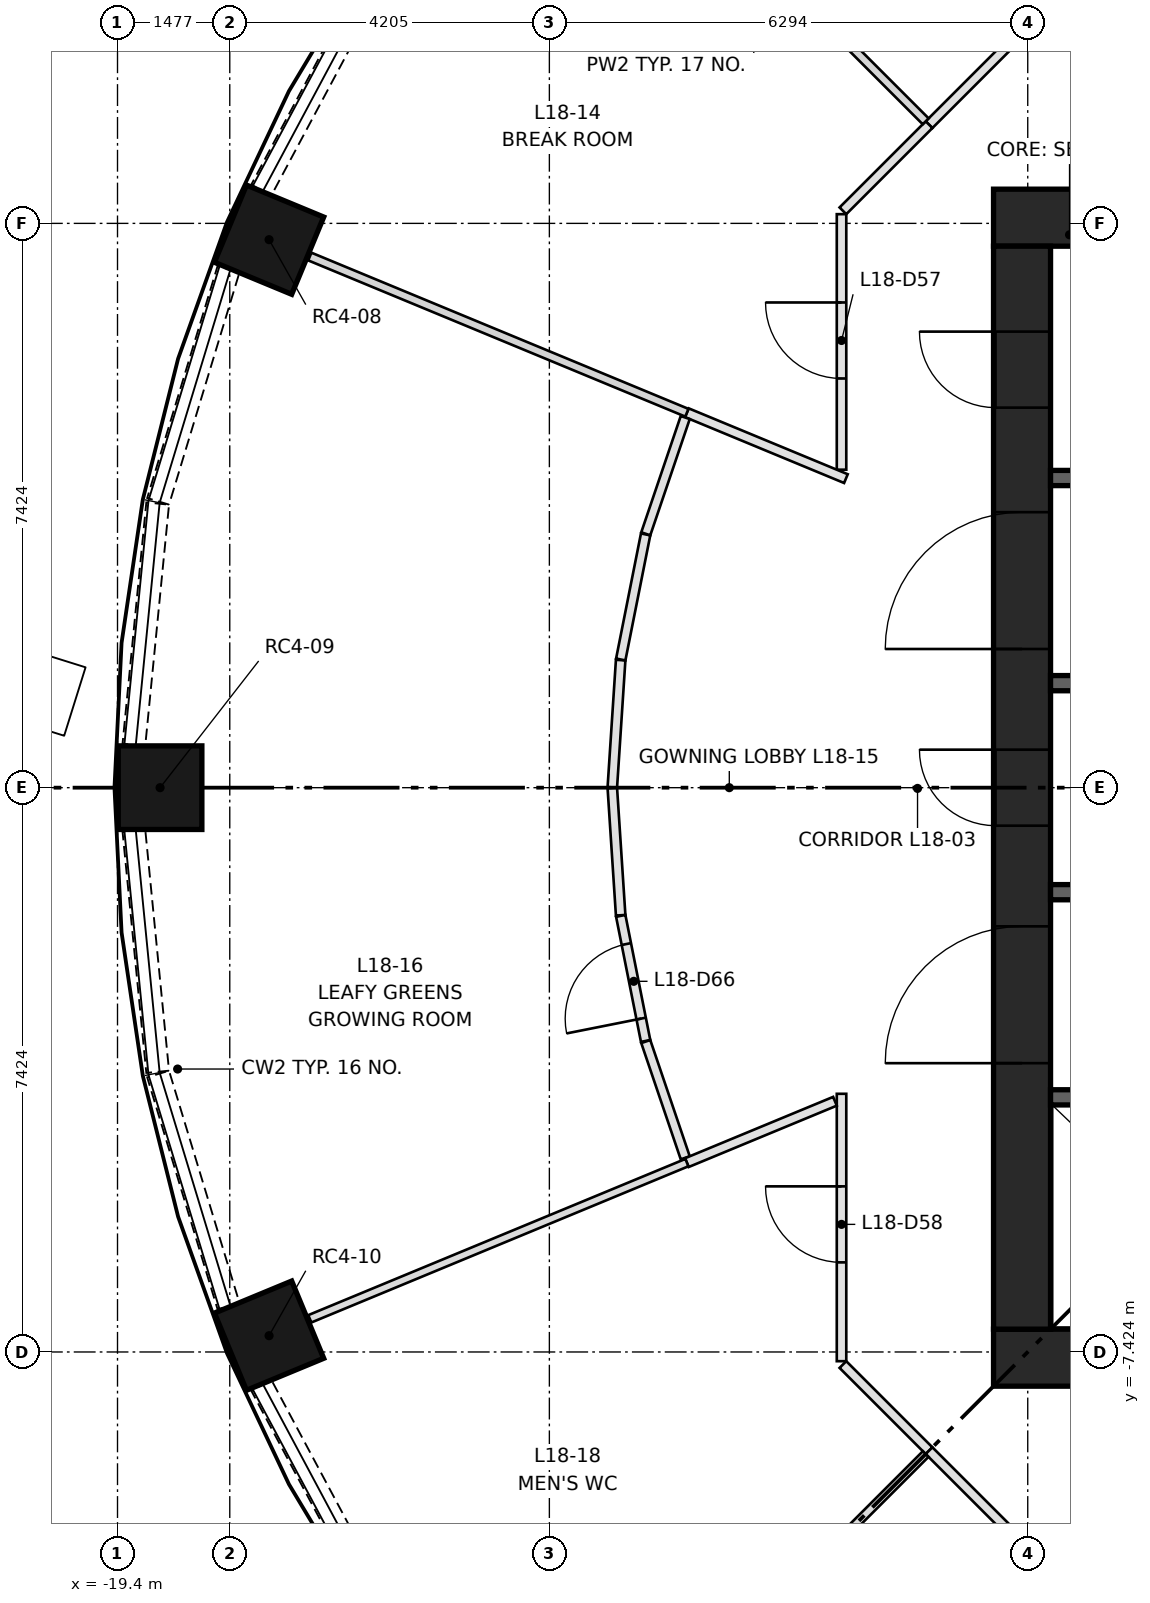
"""IFC4 building model, lengths in metres.
Left out: names, types, materials, properties, quantities, classifications, styles, units other than length and angle.
Written with IfcOpenShell. Run it as: python <this file> out.ifc"""

import sys

from ifc_helpers import new_model, si_unit, direction, frame, frame_2d, origin, origin_2d, place, context, subcontext, project, spatial, rectangle, extrude, element, fill, save


model = new_model("IFC4")
c1 = context("Model", 3, precision=1e-05, world=origin(), true_north=direction((0.0, 1.0)))
c2 = subcontext(c1, "Body", "Model", "MODEL_VIEW")
j1 = project(units=[si_unit("LENGTHUNIT", "METRE"), si_unit("PLANEANGLEUNIT", "RADIAN")], contexts=[c1])
p1 = place(None, origin())
s1 = spatial("IfcSite", under=j1, at=p1, CompositionType="ELEMENT")
p2 = place(p1, origin())
s2 = spatial("IfcBuilding", under=s1, at=p2, CompositionType="ELEMENT")
p3 = place(p2, frame((0.0, 0.0, 72.75)))
s3 = spatial("IfcBuildingStorey", under=s2, at=p3, CompositionType="ELEMENT", Elevation=72.75)
for number, where, z_axis, x_axis in (
    (1, (-17.406, 7.21, 0.0), (0.0, 0.0, 1.0), (-0.924, 0.383, 0.0)),
    (2, (-18.84, 0.0, 0.0), (0.0, 0.0, 1.0), (-1.0, 0.0, 0.0)),
    (3, (-17.406, -7.21, 0.0), (0.0, 0.0, 1.0), (-0.924, -0.383, 0.0)),
):
    element("IfcColumn", number, at=place(p3, frame(where, z_axis=z_axis, x_axis=x_axis)), inside=s3, PredefinedType="COLUMN", context=c2, shape_type="SweptSolid", body=[
        extrude(rectangle(XDim=1.1, YDim=1.1, at=origin_2d()), origin(), (0.0, 0.0, 1.0), 3.65),
    ])
for number, where, z_axis, x_axis in (
    (4, (-7.874, -7.499, 0.0), (0.0, 0.0, 1.0), (1.0, 0.0, 0.0)),
    (5, (-7.874, 7.499, 0.0), (0.0, 0.0, 1.0), (1.0, 0.0, 0.0)),
):
    element("IfcWall", number, at=place(p3, frame(where, z_axis=z_axis, x_axis=x_axis)), inside=s3, PredefinedType="SHEAR", context=c2, shape_type="SweptSolid", body=[
        extrude(rectangle(XDim=15.748, YDim=0.75, at=frame_2d((7.874, 0.0))), origin(), (0.0, 0.0, 1.0), 3.65),
    ])
p4 = place(p3, frame((-7.499, -7.124, 0.0), z_axis=(0.0, 0.0, 1.0), x_axis=(0.0, 1.0, 0.0)))
e6 = element("IfcWall", 6, at=p4, inside=s3, PredefinedType="SHEAR", context=c2, shape_type="SweptSolid", body=[
    extrude(rectangle(XDim=14.248, YDim=0.75, at=frame_2d((7.124, 0.0))), origin(), (0.0, 0.0, 1.0), 3.65),
])
p5 = place(p4, frame((6.624, 0.0, 0.0)))
e7 = element("IfcOpeningElement", 7, at=p5, cuts=e6, PredefinedType="OPENING", context=c2, shape_type="SweptSolid", body=[
    extrude(rectangle(XDim=1.0, YDim=2.1, at=frame_2d((0.5, 1.05))), frame((0.0, 0.385, 0.0), z_axis=(0.0, -1.0, 0.0), x_axis=(1.0, 0.0, 0.0)), (0.0, 0.0, 1.0), 0.77),
])
p6 = place(p4, frame((3.5, 0.0, 0.0)))
e8 = element("IfcOpeningElement", 8, at=p6, cuts=e6, PredefinedType="OPENING", context=c2, shape_type="SweptSolid", body=[
    extrude(rectangle(XDim=1.8, YDim=2.1, at=frame_2d((0.9, 1.05))), frame((0.0, 0.385, 0.0), z_axis=(0.0, -1.0, 0.0), x_axis=(1.0, 0.0, 0.0)), (0.0, 0.0, 1.0), 0.77),
])
p7 = place(p4, frame((8.948, 0.0, 0.0)))
e9 = element("IfcOpeningElement", 9, at=p7, cuts=e6, PredefinedType="OPENING", context=c2, shape_type="SweptSolid", body=[
    extrude(rectangle(XDim=1.8, YDim=2.1, at=frame_2d((0.9, 1.05))), frame((0.0, 0.385, 0.0), z_axis=(0.0, -1.0, 0.0), x_axis=(1.0, 0.0, 0.0)), (0.0, 0.0, 1.0), 0.77),
])
p8 = place(p4, frame((12.124, 0.0, 0.0)))
e10 = element("IfcOpeningElement", 10, at=p8, cuts=e6, PredefinedType="OPENING", context=c2, shape_type="SweptSolid", body=[
    extrude(rectangle(XDim=1.0, YDim=2.1, at=frame_2d((0.5, 1.05))), frame((0.0, 0.385, 0.0), z_axis=(0.0, -1.0, 0.0), x_axis=(1.0, 0.0, 0.0)), (0.0, 0.0, 1.0), 0.77),
])
p9 = place(p3, frame((-7.124, -4.074, 0.0), z_axis=(0.0, 0.0, 1.0), x_axis=(1.0, 0.0, 0.0)))
e11 = element("IfcWall", 11, at=p9, inside=s3, PredefinedType="SHEAR", context=c2, shape_type="SweptSolid", body=[
    extrude(rectangle(XDim=14.248, YDim=0.2, at=frame_2d((7.124, 0.0))), origin(), (0.0, 0.0, 1.0), 3.3),
])
p10 = place(p9, frame((1.069, 0.0, 0.0)))
e12 = element("IfcOpeningElement", 12, at=p10, cuts=e11, PredefinedType="OPENING", context=c2, shape_type="SweptSolid", body=[
    extrude(rectangle(XDim=1.1, YDim=2.1, at=frame_2d((0.55, 1.05))), frame((0.0, 0.11, 0.0), z_axis=(0.0, -1.0, 0.0), x_axis=(1.0, 0.0, 0.0)), (0.0, 0.0, 1.0), 0.22),
])
p11 = place(p9, frame((4.206, 0.0, 0.0)))
e13 = element("IfcOpeningElement", 13, at=p11, cuts=e11, PredefinedType="OPENING", context=c2, shape_type="SweptSolid", body=[
    extrude(rectangle(XDim=1.1, YDim=2.1, at=frame_2d((0.55, 1.05))), frame((0.0, 0.11, 0.0), z_axis=(0.0, -1.0, 0.0), x_axis=(1.0, 0.0, 0.0)), (0.0, 0.0, 1.0), 0.22),
])
p12 = place(p9, frame((6.808, 0.0, 0.0)))
e14 = element("IfcOpeningElement", 14, at=p12, cuts=e11, PredefinedType="OPENING", context=c2, shape_type="SweptSolid", body=[
    extrude(rectangle(XDim=1.0, YDim=2.1, at=frame_2d((0.5, 1.05))), frame((0.0, 0.11, 0.0), z_axis=(0.0, -1.0, 0.0), x_axis=(1.0, 0.0, 0.0)), (0.0, 0.0, 1.0), 0.22),
])
p13 = place(p9, frame((8.777, 0.0, 0.0)))
e15 = element("IfcOpeningElement", 15, at=p13, cuts=e11, PredefinedType="OPENING", context=c2, shape_type="SweptSolid", body=[
    extrude(rectangle(XDim=1.0, YDim=2.1, at=frame_2d((0.5, 1.05))), frame((0.0, 0.11, 0.0), z_axis=(0.0, -1.0, 0.0), x_axis=(1.0, 0.0, 0.0)), (0.0, 0.0, 1.0), 0.22),
])
p14 = place(p9, frame((10.745, 0.0, 0.0)))
e16 = element("IfcOpeningElement", 16, at=p14, cuts=e11, PredefinedType="OPENING", context=c2, shape_type="SweptSolid", body=[
    extrude(rectangle(XDim=1.0, YDim=2.1, at=frame_2d((0.5, 1.05))), frame((0.0, 0.11, 0.0), z_axis=(0.0, -1.0, 0.0), x_axis=(1.0, 0.0, 0.0)), (0.0, 0.0, 1.0), 0.22),
])
p15 = place(p9, frame((12.714, 0.0, 0.0)))
e17 = element("IfcOpeningElement", 17, at=p15, cuts=e11, PredefinedType="OPENING", context=c2, shape_type="SweptSolid", body=[
    extrude(rectangle(XDim=1.0, YDim=2.1, at=frame_2d((0.5, 1.05))), frame((0.0, 0.11, 0.0), z_axis=(0.0, -1.0, 0.0), x_axis=(1.0, 0.0, 0.0)), (0.0, 0.0, 1.0), 0.22),
])
p16 = place(p3, frame((-7.124, 4.074, 0.0), z_axis=(0.0, 0.0, 1.0), x_axis=(1.0, 0.0, 0.0)))
e18 = element("IfcWall", 18, at=p16, inside=s3, PredefinedType="SHEAR", context=c2, shape_type="SweptSolid", body=[
    extrude(rectangle(XDim=7.124, YDim=0.2, at=frame_2d((3.562, 0.0))), origin(), (0.0, 0.0, 1.0), 3.3),
])
for number, where, z_axis, x_axis in (
    (19, (-7.124, -1.375, 0.0), (0.0, 0.0, 1.0), (1.0, 0.0, 0.0)),
    (20, (-7.124, 1.375, 0.0), (0.0, 0.0, 1.0), (1.0, 0.0, 0.0)),
):
    element("IfcWall", number, at=place(p3, frame(where, z_axis=z_axis, x_axis=x_axis)), inside=s3, PredefinedType="SHEAR", context=c2, shape_type="SweptSolid", body=[
        extrude(rectangle(XDim=2.75, YDim=0.2, at=frame_2d((1.375, 0.0))), origin(), (0.0, 0.0, 1.0), 3.3),
    ])
p17 = place(p3, frame((-16.004, 10.676, 0.0), z_axis=(0.0, 0.0, 1.0), x_axis=(-0.471354692163, -0.8819437364, 0.0)))
e21 = element("IfcWall", 21, at=p17, inside=s3, PredefinedType="SOLIDWALL", context=c2, shape_type="SweptSolid", body=[
    extrude(rectangle(XDim=3.19, YDim=0.3, at=frame_2d((1.595, 0.0))), origin(), (0.0, 0.0, 1.0), 0.9),
])
p18 = place(p3, frame((-17.939, 6.821, 0.0), z_axis=(0.0, 0.0, 1.0), x_axis=(-0.290238876314, -0.956954228099, 0.0)))
e22 = element("IfcWall", 22, at=p18, inside=s3, PredefinedType="SOLIDWALL", context=c2, shape_type="SweptSolid", body=[
    extrude(rectangle(XDim=3.191, YDim=0.3, at=frame_2d((1.595, 0.0))), origin(), (0.0, 0.0, 1.0), 0.9),
])
for number, where, z_axis, x_axis in (
    (23, (-18.872, 3.738, 0.0), (0.0, 0.0, 1.0), (-0.098, -0.995, 0.0)),
    (24, (-19.185, -0.564, 0.0), (0.0, 0.0, 1.0), (0.098, -0.995, 0.0)),
):
    element("IfcWall", number, at=place(p3, frame(where, z_axis=z_axis, x_axis=x_axis)), inside=s3, PredefinedType="SOLIDWALL", context=c2, shape_type="SweptSolid", body=[
        extrude(rectangle(XDim=3.189, YDim=0.3, at=frame_2d((1.595, 0.0))), origin(), (0.0, 0.0, 1.0), 0.9),
    ])
p19 = place(p3, frame((-18.865, -3.767, 0.0), z_axis=(0.0, 0.0, 1.0), x_axis=(0.290238876314, -0.956954228099, 0.0)))
e25 = element("IfcWall", 25, at=p19, inside=s3, PredefinedType="SOLIDWALL", context=c2, shape_type="SweptSolid", body=[
    extrude(rectangle(XDim=3.191, YDim=0.3, at=frame_2d((1.595, 0.0))), origin(), (0.0, 0.0, 1.0), 0.9),
])
p20 = place(p3, frame((-17.508, -7.862, 0.0), z_axis=(0.0, 0.0, 1.0), x_axis=(0.471354692163, -0.8819437364, 0.0)))
e26 = element("IfcWall", 26, at=p20, inside=s3, PredefinedType="SOLIDWALL", context=c2, shape_type="SweptSolid", body=[
    extrude(rectangle(XDim=3.19, YDim=0.3, at=frame_2d((1.595, 0.0))), origin(), (0.0, 0.0, 1.0), 0.9),
])
p21 = place(p3, frame((-8.722, 8.722, 0.0), z_axis=(0.0, 0.0, 1.0), x_axis=(0.707030604857, 0.70718294931, 0.0)))
e27 = element("IfcWall", 27, at=p21, inside=s3, PredefinedType="PARTITIONING", context=c2, shape_type="SweptSolid", body=[
    extrude(rectangle(XDim=1.603, YDim=0.125, at=frame_2d((0.801, 0.0))), origin(), (0.0, 0.0, 1.0), 3.3),
])
p22 = place(p3, frame((-9.874, 4.183, 0.0), z_axis=(0.0, 0.0, 1.0), x_axis=(0.0, 1.0, 0.0)))
e28 = element("IfcWall", 28, at=p22, inside=s3, PredefinedType="PARTITIONING", context=c2, shape_type="SweptSolid", body=[
    extrude(rectangle(XDim=3.362, YDim=0.125, at=frame_2d((1.681, 0.0))), origin(), (0.0, 0.0, 1.0), 3.3),
])
p23 = place(p22, frame((1.2, 0.0, 0.0)))
e29 = element("IfcOpeningElement", 29, at=p23, cuts=e28, PredefinedType="OPENING", context=c2, shape_type="SweptSolid", body=[
    extrude(rectangle(XDim=1.0, YDim=2.1, at=frame_2d((0.5, 1.05))), frame((0.0, 0.073, 0.0), z_axis=(0.0, -1.0, 0.0), x_axis=(1.0, 0.0, 0.0)), (0.0, 0.0, 1.0), 0.145),
])
p24 = place(p3, frame((-9.856, 7.589, 0.0), z_axis=(0.0, 0.0, 1.0), x_axis=(0.70718294931, 0.707030604857, 0.0)))
e30 = element("IfcWall", 30, at=p24, inside=s3, PredefinedType="PARTITIONING", context=c2, shape_type="SweptSolid", body=[
    extrude(rectangle(XDim=1.603, YDim=0.125, at=frame_2d((0.801, 0.0))), origin(), (0.0, 0.0, 1.0), 3.3),
])
p25 = place(p3, frame((-9.874, -7.545, 0.0), z_axis=(0.0, 0.0, 1.0), x_axis=(0.0, 1.0, 0.0)))
e31 = element("IfcWall", 31, at=p25, inside=s3, PredefinedType="PARTITIONING", context=c2, shape_type="SweptSolid", body=[
    extrude(rectangle(XDim=3.518, YDim=0.125, at=frame_2d((1.759, 0.0))), origin(), (0.0, 0.0, 1.0), 3.3),
])
p26 = place(p25, frame((1.3, 0.0, 0.0)))
e32 = element("IfcOpeningElement", 32, at=p26, cuts=e31, PredefinedType="OPENING", context=c2, shape_type="SweptSolid", body=[
    extrude(rectangle(XDim=1.0, YDim=2.1, at=frame_2d((0.5, 1.05))), frame((0.0, 0.073, 0.0), z_axis=(0.0, -1.0, 0.0), x_axis=(1.0, 0.0, 0.0)), (0.0, 0.0, 1.0), 0.145),
])
for number, where, z_axis, x_axis in (
    (33, (-8.722, -8.722, 0.0), (0.0, 0.0, 1.0), (-0.707, 0.707, 0.0)),
    (34, (-7.589, -9.856, 0.0), (0.0, 0.0, 1.0), (-0.707, 0.707, 0.0)),
):
    element("IfcWall", number, at=place(p3, frame(where, z_axis=z_axis, x_axis=x_axis)), inside=s3, PredefinedType="PARTITIONING", context=c2, shape_type="SweptSolid", body=[
        extrude(rectangle(XDim=1.603, YDim=0.125, at=frame_2d((0.801, 0.0))), origin(), (0.0, 0.0, 1.0), 3.3),
    ])
p27 = place(p3, frame((-8.767, 8.767, 0.0), z_axis=(0.0, 0.0, 1.0), x_axis=(-0.707106781187, 0.707106781187, 0.0)))
e35 = element("IfcWall", 35, at=p27, inside=s3, PredefinedType="PARTITIONING", context=c2, shape_type="SweptSolid", body=[
    extrude(rectangle(XDim=5.862, YDim=0.11, at=frame_2d((2.931, 0.0))), origin(), (0.0, 0.0, 1.0), 3.3),
])
p28 = place(p3, frame((-9.816, 4.066, 0.0), z_axis=(0.0, 0.0, 1.0), x_axis=(-0.923834180818, 0.382792902694, 0.0)))
e36 = element("IfcWall", 36, at=p28, inside=s3, PredefinedType="PARTITIONING", context=c2, shape_type="SweptSolid", body=[
    extrude(rectangle(XDim=2.265, YDim=0.125, at=frame_2d((1.132, 0.0))), origin(), (0.0, 0.0, 1.0), 3.3),
])
p29 = place(p3, frame((-11.909, 4.933, 0.0), z_axis=(0.0, 0.0, 1.0), x_axis=(-0.923889947991, 0.382658286204, 0.0)))
e37 = element("IfcWall", 37, at=p29, inside=s3, PredefinedType="PARTITIONING", context=c2, shape_type="SweptSolid", body=[
    extrude(rectangle(XDim=5.37, YDim=0.11, at=frame_2d((2.685, 0.0))), origin(), (0.0, 0.0, 1.0), 3.3),
])
for number, where, z_axis, x_axis in (
    (38, (-12.89, 0.004, 0.0), (0.0, 0.0, 1.0), (0.065, 0.998, 0.0)),
    (39, (-12.78, -1.678, 0.0), (0.0, 0.0, 1.0), (-0.065, 0.998, 0.0)),
    (40, (-12.779, 1.687, 0.0), (0.0, 0.0, 1.0), (0.195, 0.981, 0.0)),
):
    element("IfcWall", number, at=place(p3, frame(where, z_axis=z_axis, x_axis=x_axis)), inside=s3, PredefinedType="PARTITIONING", context=c2, shape_type="SweptSolid", body=[
        extrude(rectangle(XDim=1.678, YDim=0.125, at=frame_2d((0.839, 0.0))), origin(), (0.0, 0.0, 1.0), 3.3),
    ])
p30 = place(p3, frame((-12.452, -3.332, 0.0), z_axis=(0.0, 0.0, 1.0), x_axis=(-0.194968796467, 0.980809445511, 0.0)))
e41 = element("IfcWall", 41, at=p30, inside=s3, PredefinedType="PARTITIONING", context=c2, shape_type="SweptSolid", body=[
    extrude(rectangle(XDim=1.678, YDim=0.125, at=frame_2d((0.839, 0.0))), origin(), (0.0, 0.0, 1.0), 3.3),
])
p31 = place(p30, frame((0.3, 0.0, 0.0)))
e42 = element("IfcOpeningElement", 42, at=p31, cuts=e41, PredefinedType="OPENING", context=c2, shape_type="SweptSolid", body=[
    extrude(rectangle(XDim=1.0, YDim=2.1, at=frame_2d((0.5, 1.05))), frame((0.0, 0.073, 0.0), z_axis=(0.0, -1.0, 0.0), x_axis=(1.0, 0.0, 0.0)), (0.0, 0.0, 1.0), 0.145),
])
for number, where, z_axis, x_axis in (
    (43, (-12.449, 3.34, 0.0), (0.0, 0.0, 1.0), (0.321, 0.947, 0.0)),
    (44, (-11.93, -4.87, 0.0), (0.0, 0.0, 1.0), (-0.321, 0.947, 0.0)),
):
    element("IfcWall", number, at=place(p3, frame(where, z_axis=z_axis, x_axis=x_axis)), inside=s3, PredefinedType="PARTITIONING", context=c2, shape_type="SweptSolid", body=[
        extrude(rectangle(XDim=1.615, YDim=0.125, at=frame_2d((0.808, 0.0))), origin(), (0.0, 0.0, 1.0), 3.3),
    ])
p32 = place(p3, frame((-9.96, -4.126, 0.0), z_axis=(0.0, 0.0, 1.0), x_axis=(-0.923855963606, -0.38274032778, 0.0)))
e45 = element("IfcWall", 45, at=p32, inside=s3, PredefinedType="PARTITIONING", context=c2, shape_type="SweptSolid", body=[
    extrude(rectangle(XDim=2.109, YDim=0.125, at=frame_2d((1.054, 0.0))), origin(), (0.0, 0.0, 1.0), 3.3),
])
p33 = place(p3, frame((-11.909, -4.933, 0.0), z_axis=(0.0, 0.0, 1.0), x_axis=(-0.923889947991, -0.382658286204, 0.0)))
e46 = element("IfcWall", 46, at=p33, inside=s3, PredefinedType="PARTITIONING", context=c2, shape_type="SweptSolid", body=[
    extrude(rectangle(XDim=5.37, YDim=0.105, at=frame_2d((2.685, 0.0))), origin(), (0.0, 0.0, 1.0), 3.3),
])
p34 = place(p3, frame((-12.912, -12.912, 0.0), z_axis=(0.0, 0.0, 1.0), x_axis=(0.707106781187, 0.707106781187, 0.0)))
e47 = element("IfcWall", 47, at=p34, inside=s3, PredefinedType="PARTITIONING", context=c2, shape_type="SweptSolid", body=[
    extrude(rectangle(XDim=5.862, YDim=0.105, at=frame_2d((2.931, 0.0))), origin(), (0.0, 0.0, 1.0), 3.3),
])
p35 = place(p5, origin())
e48 = element("IfcDoor", 48, at=p35, inside=s3, OperationType="SINGLE_SWING_RIGHT", PredefinedType="DOOR", context=c2, shape_type="SweptSolid", body=[
    extrude(rectangle(XDim=1.0, YDim=2.1, at=frame_2d((0.5, 1.05))), frame((0.0, 0.375, 0.0), z_axis=(0.0, -1.0, 0.0), x_axis=(1.0, 0.0, 0.0)), (0.0, 0.0, 1.0), 0.05),
])
fill(e7, e48)
p36 = place(p6, origin())
e49 = element("IfcDoor", 49, at=p36, inside=s3, OperationType="DOUBLE_DOOR_SINGLE_SWING", PredefinedType="DOOR", context=c2, shape_type="SweptSolid", body=[
    extrude(rectangle(XDim=1.8, YDim=2.1, at=frame_2d((0.9, 1.05))), frame((0.0, 0.025, 0.0), z_axis=(0.0, -1.0, 0.0), x_axis=(1.0, 0.0, 0.0)), (0.0, 0.0, 1.0), 0.05),
])
fill(e8, e49)
p37 = place(p7, origin())
e50 = element("IfcDoor", 50, at=p37, inside=s3, OperationType="DOUBLE_DOOR_SINGLE_SWING", PredefinedType="DOOR", context=c2, shape_type="SweptSolid", body=[
    extrude(rectangle(XDim=1.8, YDim=2.1, at=frame_2d((0.9, 1.05))), frame((0.0, 0.025, 0.0), z_axis=(0.0, -1.0, 0.0), x_axis=(1.0, 0.0, 0.0)), (0.0, 0.0, 1.0), 0.05),
])
fill(e9, e50)
p38 = place(p8, origin())
e51 = element("IfcDoor", 51, at=p38, inside=s3, OperationType="SINGLE_SWING_RIGHT", PredefinedType="DOOR", context=c2, shape_type="SweptSolid", body=[
    extrude(rectangle(XDim=1.0, YDim=2.1, at=frame_2d((0.5, 1.05))), frame((0.0, 0.375, 0.0), z_axis=(0.0, -1.0, 0.0), x_axis=(1.0, 0.0, 0.0)), (0.0, 0.0, 1.0), 0.05),
])
fill(e10, e51)
p39 = place(p23, origin())
e52 = element("IfcDoor", 52, at=p39, inside=s3, OperationType="SINGLE_SWING_RIGHT", PredefinedType="DOOR", context=c2, shape_type="SweptSolid", body=[
    extrude(rectangle(XDim=1.0, YDim=2.1, at=frame_2d((0.5, 1.05))), frame((0.0, 0.025, 0.0), z_axis=(0.0, -1.0, 0.0), x_axis=(1.0, 0.0, 0.0)), (0.0, 0.0, 1.0), 0.05),
])
fill(e29, e52)
p40 = place(p26, origin())
e53 = element("IfcDoor", 53, at=p40, inside=s3, OperationType="SINGLE_SWING_RIGHT", PredefinedType="DOOR", context=c2, shape_type="SweptSolid", body=[
    extrude(rectangle(XDim=1.0, YDim=2.1, at=frame_2d((0.5, 1.05))), frame((0.0, 0.025, 0.0), z_axis=(0.0, -1.0, 0.0), x_axis=(1.0, 0.0, 0.0)), (0.0, 0.0, 1.0), 0.05),
])
fill(e32, e53)
p41 = place(p31, origin())
e54 = element("IfcDoor", 54, at=p41, inside=s3, OperationType="SINGLE_SWING_LEFT", PredefinedType="DOOR", context=c2, shape_type="SweptSolid", body=[
    extrude(rectangle(XDim=1.0, YDim=2.1, at=frame_2d((0.5, 1.05))), frame((0.0, 0.025, 0.0), z_axis=(0.0, -1.0, 0.0), x_axis=(1.0, 0.0, 0.0)), (0.0, 0.0, 1.0), 0.05),
])
fill(e42, e54)
save(model, sys.argv[1])
